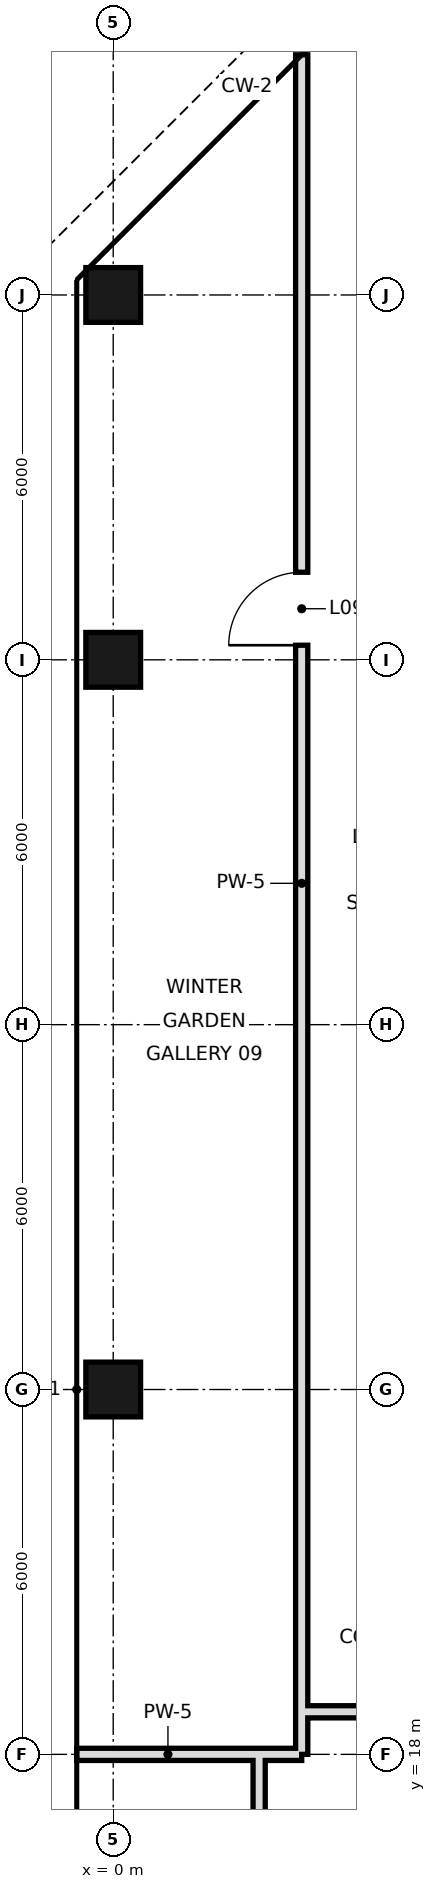
"""IFC4 building model, lengths in metres.
Left out: names, types, materials, properties, quantities, classifications, styles, units other than length and angle.
Written with IfcOpenShell. Run it as: python <this file> out.ifc"""

import sys

from ifc_helpers import new_model, si_unit, direction, frame, frame_2d, origin, origin_2d, place, context, subcontext, project, spatial, rectangle, hollow_rectangle, extrude, element, fill, save


model = new_model("IFC4")
c1 = context("Model", 3, precision=1e-05, world=origin(), true_north=direction((0.0, 1.0)))
c2 = subcontext(c1, "Body", "Model", "MODEL_VIEW")
j1 = project(units=[si_unit("LENGTHUNIT", "METRE"), si_unit("PLANEANGLEUNIT", "RADIAN")], contexts=[c1])
p1 = place(None, origin())
s1 = spatial("IfcSite", under=j1, at=p1, CompositionType="ELEMENT")
p2 = place(p1, origin())
s2 = spatial("IfcBuilding", under=s1, at=p2, CompositionType="ELEMENT")
p3 = place(p2, frame((0.0, 0.0, 53.4)))
s3 = spatial("IfcBuildingStorey", under=s2, at=p3, CompositionType="ELEMENT", Elevation=53.4)
for number, where, z_axis, x_axis in (
    (1, (0.0, 24.0, 0.0), (0.0, 0.0, 1.0), (1.0, 0.0, 0.0)),
    (2, (0.0, 36.0, 0.0), (0.0, 0.0, 1.0), (1.0, 0.0, 0.0)),
    (3, (0.0, 42.0, 0.0), (0.0, 0.0, 1.0), (1.0, 0.0, 0.0)),
):
    element("IfcColumn", number, at=place(p3, frame(where, z_axis=z_axis, x_axis=x_axis)), inside=s3, PredefinedType="COLUMN", context=c2, shape_type="SweptSolid", body=[
        extrude(hollow_rectangle(XDim=0.9, YDim=0.9, WallThickness=0.045, at=origin_2d()), origin(), (0.0, 0.0, 1.0), 3.6),
    ])
p4 = place(p3, frame((2.4, 10.8, 0.0), z_axis=(0.0, 0.0, 1.0), x_axis=(0.0, 1.0, 0.0)))
e4 = element("IfcWall", 4, at=p4, inside=s3, PredefinedType="SOLIDWALL", context=c2, shape_type="SweptSolid", body=[
    extrude(rectangle(XDim=7.2, YDim=0.2, at=frame_2d((3.6, 0.0))), origin(), (0.0, 0.0, 1.0), 2.72),
])
p5 = place(p3, frame((3.1, 18.7, 0.0), z_axis=(0.0, 0.0, 1.0), x_axis=(0.0, 1.0, 0.0)))
e5 = element("IfcWall", 5, at=p5, inside=s3, PredefinedType="SOLIDWALL", context=c2, shape_type="SweptSolid", body=[
    extrude(rectangle(XDim=27.249, YDim=0.2, at=frame_2d((13.625, 0.0))), origin(), (0.0, 0.0, 1.0), 2.97),
])
p6 = place(p5, frame((17.54, 0.0, 0.0)))
e6 = element("IfcOpeningElement", 6, at=p6, cuts=e5, PredefinedType="OPENING", context=c2, shape_type="SweptSolid", body=[
    extrude(rectangle(XDim=1.2, YDim=2.4, at=frame_2d((0.6, 1.2))), frame((0.0, 0.11, 0.0), z_axis=(0.0, -1.0, 0.0), x_axis=(1.0, 0.0, 0.0)), (0.0, 0.0, 1.0), 0.22),
])
p7 = place(p3, frame((3.1, 18.0, 0.0), z_axis=(0.0, 0.0, 1.0), x_axis=(0.0, 1.0, 0.0)))
e7 = element("IfcWall", 7, at=p7, inside=s3, PredefinedType="SOLIDWALL", context=c2, shape_type="SweptSolid", body=[
    extrude(rectangle(XDim=0.7, YDim=0.2, at=frame_2d((0.35, 0.0))), origin(), (0.0, 0.0, 1.0), 2.97),
])
p8 = place(p3, frame((-0.6, 18.0, 0.0), z_axis=(0.0, 0.0, 1.0), x_axis=(1.0, 0.0, 0.0)))
e8 = element("IfcWall", 8, at=p8, inside=s3, PredefinedType="SOLIDWALL", context=c2, shape_type="SweptSolid", body=[
    extrude(rectangle(XDim=3.0, YDim=0.2, at=frame_2d((1.5, 0.0))), origin(), (0.0, 0.0, 1.0), 2.72),
])
p9 = place(p3, frame((2.4, 18.0, 0.0), z_axis=(0.0, 0.0, 1.0), x_axis=(1.0, 0.0, 0.0)))
e9 = element("IfcWall", 9, at=p9, inside=s3, PredefinedType="SOLIDWALL", context=c2, shape_type="SweptSolid", body=[
    extrude(rectangle(XDim=0.7, YDim=0.2, at=frame_2d((0.35, 0.0))), origin(), (0.0, 0.0, 1.0), 2.97),
])
p10 = place(p3, frame((3.1, 18.7, 0.0), z_axis=(0.0, 0.0, 1.0), x_axis=(1.0, 0.0, 0.0)))
e10 = element("IfcWall", 10, at=p10, inside=s3, PredefinedType="SOLIDWALL", context=c2, shape_type="SweptSolid", body=[
    extrude(rectangle(XDim=3.5, YDim=0.2, at=frame_2d((1.75, 0.0))), origin(), (0.0, 0.0, 1.0), 2.72),
])
p11 = place(p6, origin())
e11 = element("IfcDoor", 11, at=p11, inside=s3, OperationType="SINGLE_SWING_LEFT", PredefinedType="DOOR", context=c2, shape_type="SweptSolid", body=[
    extrude(rectangle(XDim=1.2, YDim=2.4, at=frame_2d((0.6, 1.2))), frame((0.0, 0.025, 0.0), z_axis=(0.0, -1.0, 0.0), x_axis=(1.0, 0.0, 0.0)), (0.0, 0.0, 1.0), 0.05),
])
fill(e6, e11)
save(model, sys.argv[1])
